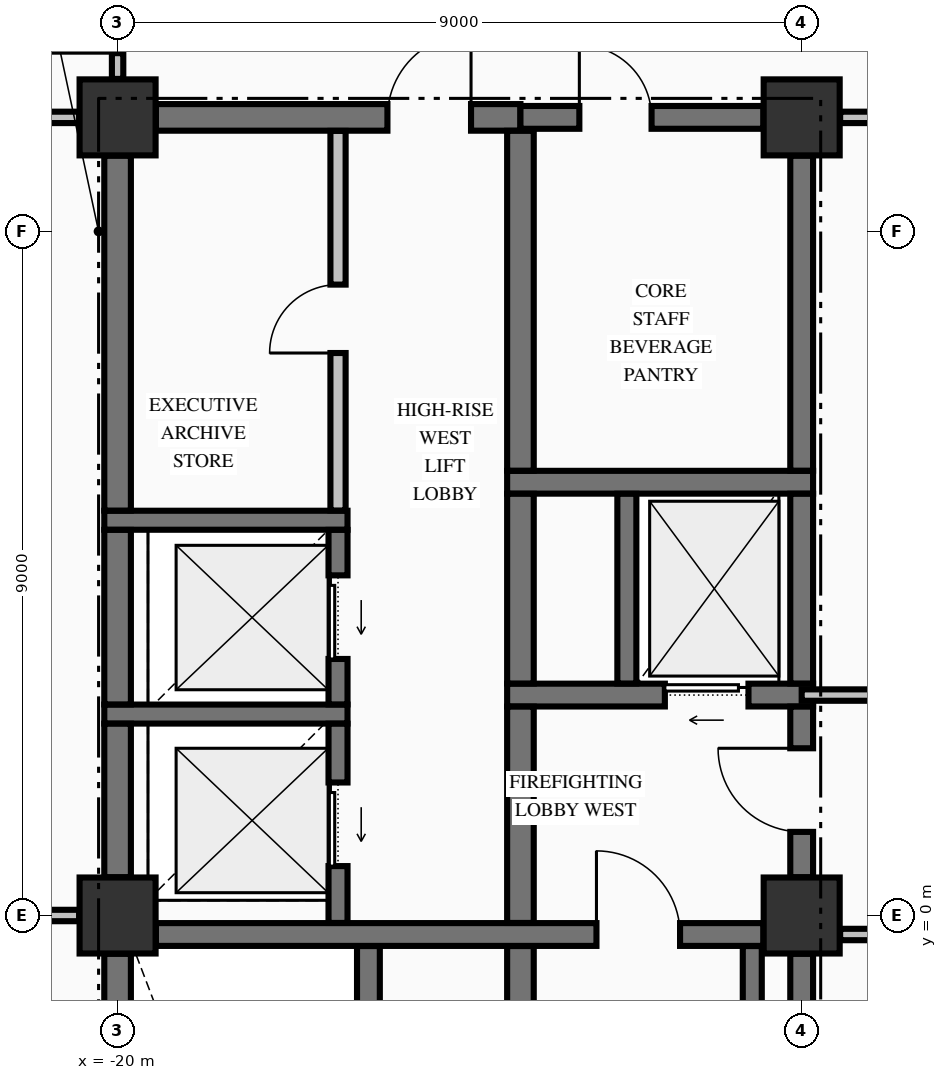
"""IFC4 building model, lengths in metres.
Left out: names, types, materials, properties, quantities, classifications, styles, units other than length and angle.
Written with IfcOpenShell. Run it as: python <this file> out.ifc"""

import sys

from ifc_helpers import new_model, si_unit, direction, frame, frame_2d, origin, origin_2d, place, context, subcontext, project, spatial, rectangle, extrude, element, fill, save


model = new_model("IFC4")
c1 = context("Model", 3, precision=1e-05, world=origin(), true_north=direction((0.0, 1.0)))
c2 = subcontext(c1, "Body", "Model", "MODEL_VIEW")
j1 = project(units=[si_unit("LENGTHUNIT", "METRE"), si_unit("PLANEANGLEUNIT", "RADIAN")], contexts=[c1])
p1 = place(None, origin())
s1 = spatial("IfcSite", under=j1, at=p1, CompositionType="ELEMENT")
p2 = place(p1, origin())
s2 = spatial("IfcBuilding", under=s1, at=p2, CompositionType="ELEMENT")
p3 = place(p2, frame((0.0, 0.0, 278.06)))
s3 = spatial("IfcBuildingStorey", under=s2, at=p3, CompositionType="ELEMENT", Elevation=278.06)
for number, where, z_axis, x_axis in (
    (1, (-20.0, 10.5, -0.425), (0.0, 0.0, 1.0), (1.0, 0.0, 0.0)),
    (2, (-11.0, 0.0, -0.425), (0.0, 0.0, 1.0), (1.0, 0.0, 0.0)),
    (3, (-11.0, 10.5, -0.425), (0.0, 0.0, 1.0), (1.0, 0.0, 0.0)),
    (4, (-20.0, 0.0, -0.425), (0.0, 0.0, 1.0), (1.0, 0.0, 0.0)),
):
    element("IfcColumn", number, at=place(p3, frame(where, z_axis=z_axis, x_axis=x_axis)), inside=s3, PredefinedType="COLUMN", context=c2, shape_type="SweptSolid", body=[
        extrude(rectangle(XDim=1.0, YDim=1.0, at=origin_2d()), origin(), (0.0, 0.0, 1.0), 3.84),
    ])
p4 = place(p3, frame((-19.496, -0.25, 0.0), z_axis=(0.0, 0.0, 1.0), x_axis=(1.0, 0.0, 0.0)))
e5 = element("IfcWall", 5, at=p4, inside=s3, PredefinedType="SHEAR", context=c2, shape_type="SweptSolid", body=[
    extrude(rectangle(XDim=7.992, YDim=0.3, at=frame_2d((3.996, 0.0))), origin(), (0.0, 0.0, 1.0), 3.415),
])
p5 = place(p4, frame((5.796, 0.0, 0.0)))
e6 = element("IfcOpeningElement", 6, at=p5, cuts=e5, PredefinedType="OPENING", context=c2, shape_type="SweptSolid", body=[
    extrude(rectangle(XDim=1.1, YDim=2.15, at=frame_2d((0.55, 1.075))), frame((0.0, 0.16, 0.0), z_axis=(0.0, -1.0, 0.0), x_axis=(1.0, 0.0, 0.0)), (0.0, 0.0, 1.0), 0.32),
])
p6 = place(p3, frame((-20.175, 2.65, 0.0), z_axis=(0.0, 0.0, 1.0), x_axis=(1.0, 0.0, 0.0)))
e7 = element("IfcWall", 7, at=p6, inside=s3, PredefinedType="SOLIDWALL", context=c2, shape_type="SweptSolid", body=[
    extrude(rectangle(XDim=3.2, YDim=0.25, at=frame_2d((1.6, 0.0))), origin(), (0.0, 0.0, 1.0), 3.415),
])
p7 = place(p3, frame((-14.875, 2.9, 0.0), z_axis=(0.0, 0.0, 1.0), x_axis=(1.0, 0.0, 0.0)))
e8 = element("IfcWall", 8, at=p7, inside=s3, PredefinedType="SHEAR", context=c2, shape_type="SweptSolid", body=[
    extrude(rectangle(XDim=4.025, YDim=0.3, at=frame_2d((2.012, 0.0))), origin(), (0.0, 0.0, 1.0), 3.415),
])
p8 = place(p7, frame((2.075, 0.0, 0.0)))
e9 = element("IfcOpeningElement", 9, at=p8, cuts=e8, PredefinedType="OPENING", context=c2, shape_type="SweptSolid", body=[
    extrude(rectangle(XDim=1.1, YDim=2.2, at=frame_2d((0.55, 1.1))), frame((0.0, 0.16, 0.0), z_axis=(0.0, -1.0, 0.0), x_axis=(1.0, 0.0, 0.0)), (0.0, 0.0, 1.0), 0.32),
])
p9 = place(p3, frame((-20.175, 5.2, 0.0), z_axis=(0.0, 0.0, 1.0), x_axis=(1.0, 0.0, 0.0)))
e10 = element("IfcWall", 10, at=p9, inside=s3, PredefinedType="SOLIDWALL", context=c2, shape_type="SweptSolid", body=[
    extrude(rectangle(XDim=3.2, YDim=0.25, at=frame_2d((1.6, 0.0))), origin(), (0.0, 0.0, 1.0), 3.415),
])
p10 = place(p3, frame((-14.875, 5.7, 0.0), z_axis=(0.0, 0.0, 1.0), x_axis=(1.0, 0.0, 0.0)))
e11 = element("IfcWall", 11, at=p10, inside=s3, PredefinedType="SHEAR", context=c2, shape_type="SweptSolid", body=[
    extrude(rectangle(XDim=4.025, YDim=0.3, at=frame_2d((2.012, 0.0))), origin(), (0.0, 0.0, 1.0), 3.415),
])
p11 = place(p3, frame((-19.496, 10.5, 0.0), z_axis=(0.0, 0.0, 1.0), x_axis=(1.0, 0.0, 0.0)))
e12 = element("IfcWall", 12, at=p11, inside=s3, PredefinedType="SHEAR", context=c2, shape_type="SweptSolid", body=[
    extrude(rectangle(XDim=4.796, YDim=0.35, at=frame_2d((2.398, 0.0))), origin(), (0.0, 0.0, 1.0), 3.415),
])
p12 = place(p11, frame((3.046, 0.0, 0.0)))
e13 = element("IfcOpeningElement", 13, at=p12, cuts=e12, PredefinedType="OPENING", context=c2, shape_type="SweptSolid", body=[
    extrude(rectangle(XDim=1.1, YDim=2.15, at=frame_2d((0.55, 1.075))), frame((0.0, 0.185, 0.0), z_axis=(0.0, -1.0, 0.0), x_axis=(1.0, 0.0, 0.0)), (0.0, 0.0, 1.0), 0.37),
])
p13 = place(p3, frame((-14.7, 10.5, 0.0), z_axis=(0.0, 0.0, 1.0), x_axis=(1.0, 0.0, 0.0)))
e14 = element("IfcWall", 14, at=p13, inside=s3, PredefinedType="SHEAR", context=c2, shape_type="SweptSolid", body=[
    extrude(rectangle(XDim=3.196, YDim=0.3, at=frame_2d((1.598, 0.0))), origin(), (0.0, 0.0, 1.0), 3.415),
])
p14 = place(p13, frame((0.775, 0.0, 0.0)))
e15 = element("IfcOpeningElement", 15, at=p14, cuts=e14, PredefinedType="OPENING", context=c2, shape_type="SweptSolid", body=[
    extrude(rectangle(XDim=0.95, YDim=2.15, at=frame_2d((0.475, 1.075))), frame((0.0, 0.16, 0.0), z_axis=(0.0, -1.0, 0.0), x_axis=(1.0, 0.0, 0.0)), (0.0, 0.0, 1.0), 0.32),
])
p15 = place(p3, frame((-10.494, -0.25, 0.0), z_axis=(0.0, 0.0, 1.0), x_axis=(1.0, 0.0, 0.0)))
e16 = element("IfcWall", 16, at=p15, inside=s3, PredefinedType="PARTITIONING", context=c2, shape_type="SweptSolid", body=[
    extrude(rectangle(XDim=20.988, YDim=0.15, at=frame_2d((10.494, 0.0))), origin(), (0.0, 0.0, 1.0), 3.415),
])
p16 = place(p15, frame((6.244, 0.0, 0.0)))
e17 = element("IfcOpeningElement", 17, at=p16, cuts=e16, PredefinedType="OPENING", context=c2, shape_type="SweptSolid", body=[
    extrude(rectangle(XDim=1.1, YDim=2.15, at=frame_2d((0.55, 1.075))), frame((0.0, 0.085, 0.0), z_axis=(0.0, -1.0, 0.0), x_axis=(1.0, 0.0, 0.0)), (0.0, 0.0, 1.0), 0.17),
])
p17 = place(p15, frame((2.069, 0.0, 0.0)))
e18 = element("IfcOpeningElement", 18, at=p17, cuts=e16, PredefinedType="OPENING", context=c2, shape_type="SweptSolid", body=[
    extrude(rectangle(XDim=1.05, YDim=2.15, at=frame_2d((0.525, 1.075))), frame((0.0, 0.085, 0.0), z_axis=(0.0, -1.0, 0.0), x_axis=(1.0, 0.0, 0.0)), (0.0, 0.0, 1.0), 0.17),
])
p18 = place(p15, frame((14.219, 0.0, 0.0)))
e19 = element("IfcOpeningElement", 19, at=p18, cuts=e16, PredefinedType="OPENING", context=c2, shape_type="SweptSolid", body=[
    extrude(rectangle(XDim=0.95, YDim=2.15, at=frame_2d((0.475, 1.075))), frame((0.0, 0.085, 0.0), z_axis=(0.0, -1.0, 0.0), x_axis=(1.0, 0.0, 0.0)), (0.0, 0.0, 1.0), 0.17),
])
p19 = place(p3, frame((-25.569, 0.0, 0.0), z_axis=(0.0, 0.0, 1.0), x_axis=(1.0, 0.0, 0.0)))
e20 = element("IfcWall", 20, at=p19, inside=s3, PredefinedType="PARTITIONING", context=c2, shape_type="SweptSolid", body=[
    extrude(rectangle(XDim=5.063, YDim=0.15, at=frame_2d((2.531, 0.0))), origin(), (0.0, 0.0, 1.0), 3.005),
])
p20 = place(p3, frame((-11.0, 2.9, 0.0), z_axis=(0.0, 0.0, 1.0), x_axis=(1.0, 0.0, 0.0)))
e21 = element("IfcWall", 21, at=p20, inside=s3, PredefinedType="PARTITIONING", context=c2, shape_type="SweptSolid", body=[
    extrude(rectangle(XDim=22.0, YDim=0.15, at=frame_2d((11.0, 0.0))), origin(), (0.0, 0.0, 1.0), 3.415),
])
p21 = place(p20, frame((6.75, 0.0, 0.0)))
e22 = element("IfcOpeningElement", 22, at=p21, cuts=e21, PredefinedType="OPENING", context=c2, shape_type="SweptSolid", body=[
    extrude(rectangle(XDim=1.1, YDim=2.15, at=frame_2d((0.55, 1.075))), frame((0.0, 0.085, 0.0), z_axis=(0.0, -1.0, 0.0), x_axis=(1.0, 0.0, 0.0)), (0.0, 0.0, 1.0), 0.17),
])
p22 = place(p20, frame((2.575, 0.0, 0.0)))
e23 = element("IfcOpeningElement", 23, at=p22, cuts=e21, PredefinedType="OPENING", context=c2, shape_type="SweptSolid", body=[
    extrude(rectangle(XDim=1.05, YDim=2.15, at=frame_2d((0.525, 1.075))), frame((0.0, 0.085, 0.0), z_axis=(0.0, -1.0, 0.0), x_axis=(1.0, 0.0, 0.0)), (0.0, 0.0, 1.0), 0.17),
])
p23 = place(p20, frame((14.65, 0.0, 0.0)))
e24 = element("IfcOpeningElement", 24, at=p23, cuts=e21, PredefinedType="OPENING", context=c2, shape_type="SweptSolid", body=[
    extrude(rectangle(XDim=1.1, YDim=2.15, at=frame_2d((0.55, 1.075))), frame((0.0, 0.085, 0.0), z_axis=(0.0, -1.0, 0.0), x_axis=(1.0, 0.0, 0.0)), (0.0, 0.0, 1.0), 0.17),
])
p24 = place(p3, frame((-25.835, 10.5, 0.0), z_axis=(0.0, 0.0, 1.0), x_axis=(1.0, 0.0, 0.0)))
e25 = element("IfcWall", 25, at=p24, inside=s3, PredefinedType="PARTITIONING", context=c2, shape_type="SweptSolid", body=[
    extrude(rectangle(XDim=5.329, YDim=0.15, at=frame_2d((2.665, 0.0))), origin(), (0.0, 0.0, 1.0), 3.415),
])
p25 = place(p24, frame((2.36, 0.0, 0.0)))
e26 = element("IfcOpeningElement", 26, at=p25, cuts=e25, PredefinedType="OPENING", context=c2, shape_type="SweptSolid", body=[
    extrude(rectangle(XDim=0.95, YDim=2.15, at=frame_2d((0.475, 1.075))), frame((0.0, 0.085, 0.0), z_axis=(0.0, -1.0, 0.0), x_axis=(1.0, 0.0, 0.0)), (0.0, 0.0, 1.0), 0.17),
])
p26 = place(p3, frame((-10.494, 10.5, 0.0), z_axis=(0.0, 0.0, 1.0), x_axis=(1.0, 0.0, 0.0)))
e27 = element("IfcWall", 27, at=p26, inside=s3, PredefinedType="PARTITIONING", context=c2, shape_type="SweptSolid", body=[
    extrude(rectangle(XDim=20.988, YDim=0.15, at=frame_2d((10.494, 0.0))), origin(), (0.0, 0.0, 1.0), 3.415),
])
p27 = place(p26, frame((6.244, 0.0, 0.0)))
e28 = element("IfcOpeningElement", 28, at=p27, cuts=e27, PredefinedType="OPENING", context=c2, shape_type="SweptSolid", body=[
    extrude(rectangle(XDim=1.1, YDim=2.15, at=frame_2d((0.55, 1.075))), frame((0.0, 0.085, 0.0), z_axis=(0.0, -1.0, 0.0), x_axis=(1.0, 0.0, 0.0)), (0.0, 0.0, 1.0), 0.17),
])
p28 = place(p3, frame((-20.0, -9.446, 0.0), z_axis=(0.0, 0.0, 1.0), x_axis=(0.0, 1.0, 0.0)))
e29 = element("IfcWall", 29, at=p28, inside=s3, PredefinedType="SHEAR", context=c2, shape_type="SweptSolid", body=[
    extrude(rectangle(XDim=8.942, YDim=0.35, at=frame_2d((4.471, 0.0))), origin(), (0.0, 0.0, 1.0), 3.415),
])
p29 = place(p3, frame((-20.0, 0.504, 0.0), z_axis=(0.0, 0.0, 1.0), x_axis=(0.0, 1.0, 0.0)))
e30 = element("IfcWall", 30, at=p29, inside=s3, PredefinedType="SHEAR", context=c2, shape_type="SweptSolid", body=[
    extrude(rectangle(XDim=2.019, YDim=0.35, at=frame_2d((1.01, 0.0))), origin(), (0.0, 0.0, 1.0), 3.415),
])
p30 = place(p3, frame((-20.0, 2.777, 0.0), z_axis=(0.0, 0.0, 1.0), x_axis=(0.0, 1.0, 0.0)))
e31 = element("IfcWall", 31, at=p30, inside=s3, PredefinedType="SHEAR", context=c2, shape_type="SweptSolid", body=[
    extrude(rectangle(XDim=2.296, YDim=0.35, at=frame_2d((1.148, 0.0))), origin(), (0.0, 0.0, 1.0), 3.415),
])
p31 = place(p3, frame((-20.0, 5.327, 0.0), z_axis=(0.0, 0.0, 1.0), x_axis=(0.0, 1.0, 0.0)))
e32 = element("IfcWall", 32, at=p31, inside=s3, PredefinedType="SHEAR", context=c2, shape_type="SweptSolid", body=[
    extrude(rectangle(XDim=4.669, YDim=0.35, at=frame_2d((2.334, 0.0))), origin(), (0.0, 0.0, 1.0), 3.415),
])
p32 = place(p3, frame((-17.1, -0.098, 0.0), z_axis=(0.0, 0.0, 1.0), x_axis=(0.0, 1.0, 0.0)))
e33 = element("IfcWall", 33, at=p32, inside=s3, PredefinedType="SOLIDWALL", context=c2, shape_type="SweptSolid", body=[
    extrude(rectangle(XDim=2.621, YDim=0.25, at=frame_2d((1.311, 0.0))), origin(), (0.0, 0.0, 1.0), 3.415),
])
p33 = place(p32, frame((0.748, 0.0, 0.0)))
e34 = element("IfcOpeningElement", 34, at=p33, cuts=e33, PredefinedType="OPENING", context=c2, shape_type="SweptSolid", body=[
    extrude(rectangle(XDim=1.1, YDim=2.2, at=frame_2d((0.55, 1.1))), frame((0.0, 0.135, 0.0), z_axis=(0.0, -1.0, 0.0), x_axis=(1.0, 0.0, 0.0)), (0.0, 0.0, 1.0), 0.27),
])
p34 = place(p3, frame((-17.1, 2.777, 0.0), z_axis=(0.0, 0.0, 1.0), x_axis=(0.0, 1.0, 0.0)))
e35 = element("IfcWall", 35, at=p34, inside=s3, PredefinedType="SOLIDWALL", context=c2, shape_type="SweptSolid", body=[
    extrude(rectangle(XDim=2.296, YDim=0.25, at=frame_2d((1.148, 0.0))), origin(), (0.0, 0.0, 1.0), 3.415),
])
p35 = place(p34, frame((0.598, 0.0, 0.0)))
e36 = element("IfcOpeningElement", 36, at=p35, cuts=e35, PredefinedType="OPENING", context=c2, shape_type="SweptSolid", body=[
    extrude(rectangle(XDim=1.1, YDim=2.2, at=frame_2d((0.55, 1.1))), frame((0.0, 0.135, 0.0), z_axis=(0.0, -1.0, 0.0), x_axis=(1.0, 0.0, 0.0)), (0.0, 0.0, 1.0), 0.27),
])
p36 = place(p3, frame((-16.7, -9.773, 0.0), z_axis=(0.0, 0.0, 1.0), x_axis=(0.0, 1.0, 0.0)))
e37 = element("IfcWall", 37, at=p36, inside=s3, PredefinedType="SHEAR", context=c2, shape_type="SweptSolid", body=[
    extrude(rectangle(XDim=9.371, YDim=0.3, at=frame_2d((4.686, 0.0))), origin(), (0.0, 0.0, 1.0), 3.415),
])
p37 = place(p3, frame((-14.7, -9.773, 0.0), z_axis=(0.0, 0.0, 1.0), x_axis=(0.0, 1.0, 0.0)))
e38 = element("IfcWall", 38, at=p37, inside=s3, PredefinedType="SHEAR", context=c2, shape_type="SweptSolid", body=[
    extrude(rectangle(XDim=9.371, YDim=0.35, at=frame_2d((4.686, 0.0))), origin(), (0.0, 0.0, 1.0), 3.415),
])
p38 = place(p3, frame((-14.7, -0.098, 0.0), z_axis=(0.0, 0.0, 1.0), x_axis=(0.0, 1.0, 0.0)))
e39 = element("IfcWall", 39, at=p38, inside=s3, PredefinedType="SHEAR", context=c2, shape_type="SweptSolid", body=[
    extrude(rectangle(XDim=2.846, YDim=0.35, at=frame_2d((1.423, 0.0))), origin(), (0.0, 0.0, 1.0), 3.415),
])
p39 = place(p3, frame((-14.7, 3.052, 0.0), z_axis=(0.0, 0.0, 1.0), x_axis=(0.0, 1.0, 0.0)))
e40 = element("IfcWall", 40, at=p39, inside=s3, PredefinedType="SHEAR", context=c2, shape_type="SweptSolid", body=[
    extrude(rectangle(XDim=2.496, YDim=0.35, at=frame_2d((1.248, 0.0))), origin(), (0.0, 0.0, 1.0), 3.415),
])
p40 = place(p3, frame((-14.7, 5.852, 0.0), z_axis=(0.0, 0.0, 1.0), x_axis=(0.0, 1.0, 0.0)))
e41 = element("IfcWall", 41, at=p40, inside=s3, PredefinedType="SHEAR", context=c2, shape_type="SweptSolid", body=[
    extrude(rectangle(XDim=4.471, YDim=0.35, at=frame_2d((2.235, 0.0))), origin(), (0.0, 0.0, 1.0), 3.415),
])
p41 = place(p3, frame((-13.3, 3.052, 0.0), z_axis=(0.0, 0.0, 1.0), x_axis=(0.0, 1.0, 0.0)))
e42 = element("IfcWall", 42, at=p41, inside=s3, PredefinedType="SOLIDWALL", context=c2, shape_type="SweptSolid", body=[
    extrude(rectangle(XDim=2.496, YDim=0.25, at=frame_2d((1.248, 0.0))), origin(), (0.0, 0.0, 1.0), 3.415),
])
p42 = place(p3, frame((-11.65, -9.798, 0.0), z_axis=(0.0, 0.0, 1.0), x_axis=(0.0, 1.0, 0.0)))
e43 = element("IfcWall", 43, at=p42, inside=s3, PredefinedType="SOLIDWALL", context=c2, shape_type="SweptSolid", body=[
    extrude(rectangle(XDim=9.396, YDim=0.25, at=frame_2d((4.698, 0.0))), origin(), (0.0, 0.0, 1.0), 3.415),
])
p43 = place(p3, frame((-11.0, -9.446, 0.0), z_axis=(0.0, 0.0, 1.0), x_axis=(0.0, 1.0, 0.0)))
e44 = element("IfcWall", 44, at=p43, inside=s3, PredefinedType="SHEAR", context=c2, shape_type="SweptSolid", body=[
    extrude(rectangle(XDim=8.942, YDim=0.3, at=frame_2d((4.471, 0.0))), origin(), (0.0, 0.0, 1.0), 3.415),
])
p44 = place(p3, frame((-11.0, 0.504, 0.0), z_axis=(0.0, 0.0, 1.0), x_axis=(0.0, 1.0, 0.0)))
e45 = element("IfcWall", 45, at=p44, inside=s3, PredefinedType="SHEAR", context=c2, shape_type="SweptSolid", body=[
    extrude(rectangle(XDim=2.244, YDim=0.3, at=frame_2d((1.122, 0.0))), origin(), (0.0, 0.0, 1.0), 3.415),
])
p45 = place(p44, frame((0.596, 0.0, 0.0)))
e46 = element("IfcOpeningElement", 46, at=p45, cuts=e45, PredefinedType="OPENING", context=c2, shape_type="SweptSolid", body=[
    extrude(rectangle(XDim=1.1, YDim=2.15, at=frame_2d((0.55, 1.075))), frame((0.0, 0.16, 0.0), z_axis=(0.0, -1.0, 0.0), x_axis=(1.0, 0.0, 0.0)), (0.0, 0.0, 1.0), 0.32),
])
p46 = place(p3, frame((-11.0, 3.052, 0.0), z_axis=(0.0, 0.0, 1.0), x_axis=(0.0, 1.0, 0.0)))
e47 = element("IfcWall", 47, at=p46, inside=s3, PredefinedType="SHEAR", context=c2, shape_type="SweptSolid", body=[
    extrude(rectangle(XDim=2.496, YDim=0.3, at=frame_2d((1.248, 0.0))), origin(), (0.0, 0.0, 1.0), 3.415),
])
p47 = place(p3, frame((-11.0, 5.852, 0.0), z_axis=(0.0, 0.0, 1.0), x_axis=(0.0, 1.0, 0.0)))
e48 = element("IfcWall", 48, at=p47, inside=s3, PredefinedType="SHEAR", context=c2, shape_type="SweptSolid", body=[
    extrude(rectangle(XDim=4.144, YDim=0.3, at=frame_2d((2.072, 0.0))), origin(), (0.0, 0.0, 1.0), 3.415),
])
p48 = place(p3, frame((-20.0, 11.006, 0.0), z_axis=(0.0, 0.0, 1.0), x_axis=(0.0, 1.0, 0.0)))
e49 = element("IfcWall", 49, at=p48, inside=s3, PredefinedType="PARTITIONING", context=c2, shape_type="SweptSolid", body=[
    extrude(rectangle(XDim=2.066, YDim=0.15, at=frame_2d((1.033, 0.0))), origin(), (0.0, 0.0, 1.0), 3.415),
])
p49 = place(p48, frame((0.339, 0.0, 0.0)))
e50 = element("IfcOpeningElement", 50, at=p49, cuts=e49, PredefinedType="OPENING", context=c2, shape_type="SweptSolid", body=[
    extrude(rectangle(XDim=0.95, YDim=2.15, at=frame_2d((0.475, 1.075))), frame((0.0, 0.085, 0.0), z_axis=(0.0, -1.0, 0.0), x_axis=(1.0, 0.0, 0.0)), (0.0, 0.0, 1.0), 0.17),
])
p50 = place(p3, frame((-17.1, 5.328, 0.0), z_axis=(0.0, 0.0, 1.0), x_axis=(0.0, 1.0, 0.0)))
e51 = element("IfcWall", 51, at=p50, inside=s3, PredefinedType="PARTITIONING", context=c2, shape_type="SweptSolid", body=[
    extrude(rectangle(XDim=4.994, YDim=0.2, at=frame_2d((2.497, 0.0))), origin(), (0.0, 0.0, 1.0), 3.415),
])
p51 = place(p50, frame((2.072, 0.0, 0.0)))
e52 = element("IfcOpeningElement", 52, at=p51, cuts=e51, PredefinedType="OPENING", context=c2, shape_type="SweptSolid", body=[
    extrude(rectangle(XDim=0.9, YDim=2.15, at=frame_2d((0.45, 1.075))), frame((0.0, 0.11, 0.0), z_axis=(0.0, -1.0, 0.0), x_axis=(1.0, 0.0, 0.0)), (0.0, 0.0, 1.0), 0.22),
])
p52 = place(p5, origin())
e53 = element("IfcDoor", 53, at=p52, inside=s3, OperationType="SINGLE_SWING_LEFT", PredefinedType="DOOR", context=c2, shape_type="SweptSolid", body=[
    extrude(rectangle(XDim=1.1, YDim=2.15, at=frame_2d((0.55, 1.075))), frame((0.0, 0.025, 0.0), z_axis=(0.0, -1.0, 0.0), x_axis=(1.0, 0.0, 0.0)), (0.0, 0.0, 1.0), 0.05),
])
fill(e6, e53)
p53 = place(p45, origin())
e54 = element("IfcDoor", 54, at=p53, inside=s3, OperationType="SINGLE_SWING_RIGHT", PredefinedType="DOOR", context=c2, shape_type="SweptSolid", body=[
    extrude(rectangle(XDim=1.1, YDim=2.15, at=frame_2d((0.55, 1.075))), frame((0.0, 0.025, 0.0), z_axis=(0.0, -1.0, 0.0), x_axis=(1.0, 0.0, 0.0)), (0.0, 0.0, 1.0), 0.05),
])
fill(e46, e54)
p54 = place(p8, origin())
e55 = element("IfcDoor", 55, at=p54, inside=s3, OperationType="SLIDING_TO_LEFT", PredefinedType="DOOR", context=c2, shape_type="SweptSolid", body=[
    extrude(rectangle(XDim=1.1, YDim=2.2, at=frame_2d((0.55, 1.1))), frame((0.0, 0.025, 0.0), z_axis=(0.0, -1.0, 0.0), x_axis=(1.0, 0.0, 0.0)), (0.0, 0.0, 1.0), 0.05),
])
fill(e9, e55)
p55 = place(p14, origin())
e56 = element("IfcDoor", 56, at=p55, inside=s3, OperationType="SINGLE_SWING_LEFT", PredefinedType="DOOR", context=c2, shape_type="SweptSolid", body=[
    extrude(rectangle(XDim=0.95, YDim=2.15, at=frame_2d((0.475, 1.075))), frame((0.0, 0.025, 0.0), z_axis=(0.0, -1.0, 0.0), x_axis=(1.0, 0.0, 0.0)), (0.0, 0.0, 1.0), 0.05),
])
fill(e15, e56)
p56 = place(p33, origin())
e57 = element("IfcDoor", 57, at=p56, inside=s3, OperationType="SLIDING_TO_LEFT", PredefinedType="DOOR", context=c2, shape_type="SweptSolid", body=[
    extrude(rectangle(XDim=1.1, YDim=2.2, at=frame_2d((0.55, 1.1))), frame((0.0, 0.025, 0.0), z_axis=(0.0, -1.0, 0.0), x_axis=(1.0, 0.0, 0.0)), (0.0, 0.0, 1.0), 0.05),
])
fill(e34, e57)
p57 = place(p35, origin())
e58 = element("IfcDoor", 58, at=p57, inside=s3, OperationType="SLIDING_TO_LEFT", PredefinedType="DOOR", context=c2, shape_type="SweptSolid", body=[
    extrude(rectangle(XDim=1.1, YDim=2.2, at=frame_2d((0.55, 1.1))), frame((0.0, 0.025, 0.0), z_axis=(0.0, -1.0, 0.0), x_axis=(1.0, 0.0, 0.0)), (0.0, 0.0, 1.0), 0.05),
])
fill(e36, e58)
p58 = place(p12, origin())
e59 = element("IfcDoor", 59, at=p58, inside=s3, OperationType="SINGLE_SWING_RIGHT", PredefinedType="DOOR", context=c2, shape_type="SweptSolid", body=[
    extrude(rectangle(XDim=1.1, YDim=2.15, at=frame_2d((0.55, 1.075))), frame((0.0, 0.025, 0.0), z_axis=(0.0, -1.0, 0.0), x_axis=(1.0, 0.0, 0.0)), (0.0, 0.0, 1.0), 0.05),
])
fill(e13, e59)
p59 = place(p51, origin())
e60 = element("IfcDoor", 60, at=p59, inside=s3, OperationType="SINGLE_SWING_LEFT", PredefinedType="DOOR", context=c2, shape_type="SweptSolid", body=[
    extrude(rectangle(XDim=0.9, YDim=2.15, at=frame_2d((0.45, 1.075))), frame((0.0, 0.025, 0.0), z_axis=(0.0, -1.0, 0.0), x_axis=(1.0, 0.0, 0.0)), (0.0, 0.0, 1.0), 0.05),
])
fill(e52, e60)
p60 = place(p49, origin())
e61 = element("IfcDoor", 61, at=p60, inside=s3, OperationType="SINGLE_SWING_LEFT", PredefinedType="DOOR", context=c2, shape_type="SweptSolid", body=[
    extrude(rectangle(XDim=0.95, YDim=2.15, at=frame_2d((0.475, 1.075))), frame((0.0, 0.025, 0.0), z_axis=(0.0, -1.0, 0.0), x_axis=(1.0, 0.0, 0.0)), (0.0, 0.0, 1.0), 0.05),
])
fill(e50, e61)
save(model, sys.argv[1])
